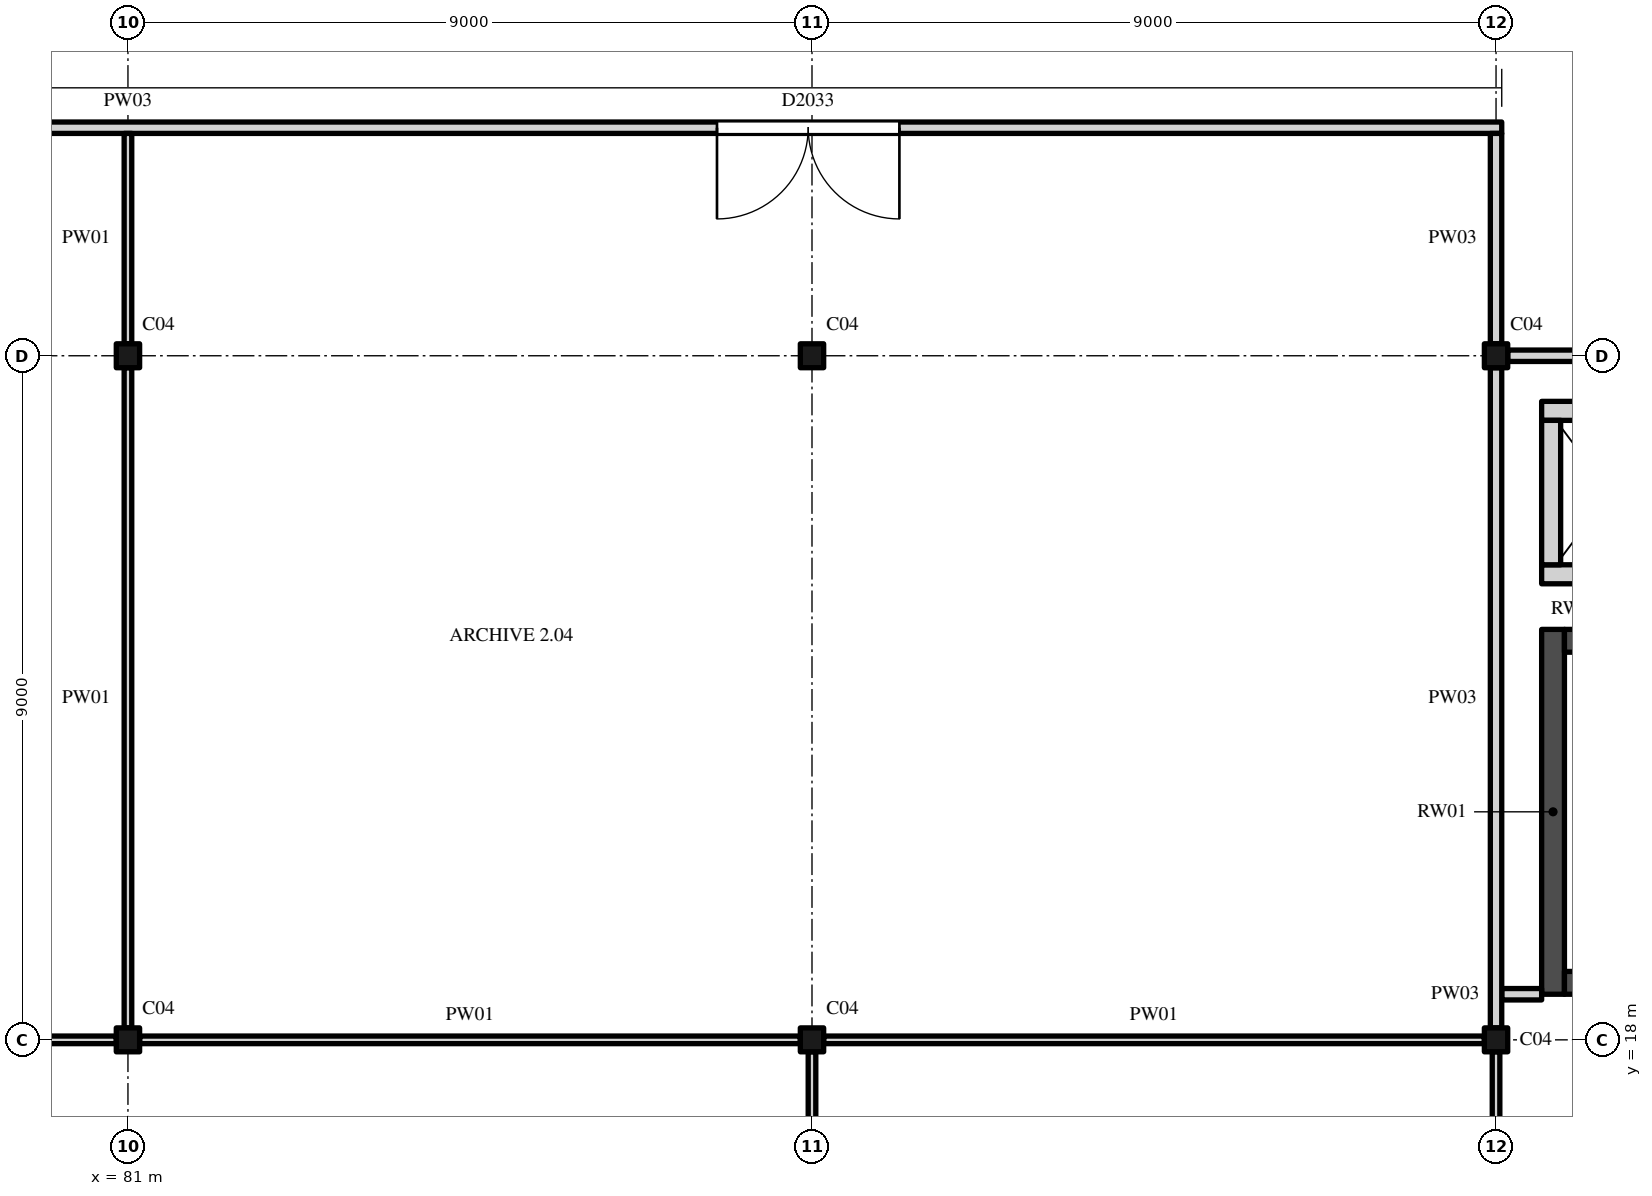
"""IFC4 building model, lengths in metres.
Left out: names, types, materials, properties, quantities, classifications, styles, units other than length and angle.
Written with IfcOpenShell. Run it as: python <this file> out.ifc"""

import sys

from ifc_helpers import new_model, si_unit, direction, frame, frame_2d, origin, origin_2d, place, context, subcontext, project, spatial, rectangle, i_section, extrude, element, fill, save


model = new_model("IFC4")
c1 = context("Model", 3, precision=1e-05, world=origin(), true_north=direction((0.0, 1.0)))
c2 = subcontext(c1, "Body", "Model", "MODEL_VIEW")
j1 = project(units=[si_unit("LENGTHUNIT", "METRE"), si_unit("PLANEANGLEUNIT", "RADIAN")], contexts=[c1])
p1 = place(None, origin())
s1 = spatial("IfcSite", under=j1, at=p1, CompositionType="ELEMENT")
p2 = place(p1, origin())
s2 = spatial("IfcBuilding", under=s1, at=p2, CompositionType="ELEMENT")
p3 = place(p2, frame((0.0, 0.0, 11.0)))
s3 = spatial("IfcBuildingStorey", under=s2, at=p3, CompositionType="ELEMENT", Elevation=11.0)
for number, where, z_axis, x_axis in (
    (1, (81.0, 18.0, 0.0), (0.0, 0.0, 1.0), (1.0, 0.0, 0.0)),
    (2, (90.0, 18.0, 0.0), (0.0, 0.0, 1.0), (1.0, 0.0, 0.0)),
    (3, (99.0, 18.0, 0.0), (0.0, 0.0, 1.0), (1.0, 0.0, 0.0)),
    (4, (81.0, 27.0, 0.0), (0.0, 0.0, 1.0), (1.0, 0.0, 0.0)),
    (5, (90.0, 27.0, 0.0), (0.0, 0.0, 1.0), (1.0, 0.0, 0.0)),
    (6, (99.0, 27.0, 0.0), (0.0, 0.0, 1.0), (1.0, 0.0, 0.0)),
):
    element("IfcColumn", number, at=place(p3, frame(where, z_axis=z_axis, x_axis=x_axis)), inside=s3, PredefinedType="COLUMN", context=c2, shape_type="SweptSolid", body=[
        extrude(i_section(OverallWidth=0.307, OverallDepth=0.315, WebThickness=0.012, FlangeThickness=0.019, FilletRadius=0.017, at=origin_2d()), origin(), (0.0, 0.0, 1.0), 5.0),
    ])
p4 = place(p3, frame((99.75, 18.6, 0.0), z_axis=(0.0, 0.0, 1.0), x_axis=(0.0, 1.0, 0.0)))
e7 = element("IfcWall", 7, at=p4, inside=s3, PredefinedType="SHEAR", context=c2, shape_type="SweptSolid", body=[
    extrude(rectangle(XDim=4.8, YDim=0.3, at=frame_2d((2.4, 0.0))), origin(), (0.0, 0.0, 1.0), 4.825),
])
p5 = place(p3, frame((99.9, 18.75, 0.0), z_axis=(0.0, 0.0, 1.0), x_axis=(1.0, 0.0, 0.0)))
e8 = element("IfcWall", 8, at=p5, inside=s3, PredefinedType="SHEAR", context=c2, shape_type="SweptSolid", body=[
    extrude(rectangle(XDim=3.45, YDim=0.3, at=frame_2d((1.725, 0.0))), origin(), (0.0, 0.0, 1.0), 4.825),
])
p6 = place(p5, frame((0.6, 0.0, 0.0)))
e9 = element("IfcOpeningElement", 9, at=p6, cuts=e8, PredefinedType="OPENING", context=c2, shape_type="SweptSolid", body=[
    extrude(rectangle(XDim=2.1, YDim=2.4, at=frame_2d((1.05, 1.2))), frame((0.0, 0.16, 0.0), z_axis=(0.0, -1.0, 0.0), x_axis=(1.0, 0.0, 0.0)), (0.0, 0.0, 1.0), 0.32),
])
p7 = place(p3, frame((99.9, 23.25, 0.0), z_axis=(0.0, 0.0, 1.0), x_axis=(1.0, 0.0, 0.0)))
e10 = element("IfcWall", 10, at=p7, inside=s3, PredefinedType="SHEAR", context=c2, shape_type="SweptSolid", body=[
    extrude(rectangle(XDim=3.45, YDim=0.3, at=frame_2d((1.725, 0.0))), origin(), (0.0, 0.0, 1.0), 4.825),
])
for number, where, z_axis, x_axis in (
    (11, (99.6, 24.125, 0.0), (0.0, 0.0, 1.0), (1.0, 0.0, 0.0)),
    (12, (99.6, 26.275, 0.0), (0.0, 0.0, 1.0), (1.0, 0.0, 0.0)),
):
    element("IfcWall", number, at=place(p3, frame(where, z_axis=z_axis, x_axis=x_axis)), inside=s3, PredefinedType="STANDARD", context=c2, shape_type="SweptSolid", body=[
        extrude(rectangle(XDim=1.8, YDim=0.25, at=frame_2d((0.9, 0.0))), origin(), (0.0, 0.0, 1.0), 4.825),
    ])
p8 = place(p3, frame((99.725, 24.25, 0.0), z_axis=(0.0, 0.0, 1.0), x_axis=(0.0, 1.0, 0.0)))
e13 = element("IfcWall", 13, at=p8, inside=s3, PredefinedType="STANDARD", context=c2, shape_type="SweptSolid", body=[
    extrude(rectangle(XDim=1.9, YDim=0.25, at=frame_2d((0.95, 0.0))), origin(), (0.0, 0.0, 1.0), 4.825),
])
for number, where, z_axis, x_axis in (
    (14, (82.5, 20.325, 5.0), (0.0, 0.0, 1.0), (1.0, 0.0, 0.0)),
    (15, (82.5, 24.675, 5.0), (0.0, 0.0, 1.0), (1.0, 0.0, 0.0)),
):
    element("IfcWall", number, at=place(p3, frame(where, z_axis=z_axis, x_axis=x_axis)), inside=s3, PredefinedType="PARAPET", context=c2, shape_type="SweptSolid", body=[
        extrude(rectangle(XDim=6.0, YDim=0.15, at=frame_2d((3.0, 0.0))), origin(), (0.0, 0.0, 1.0), 0.5),
    ])
for number, where, z_axis, x_axis in (
    (16, (82.575, 20.4, 5.0), (0.0, 0.0, 1.0), (0.0, 1.0, 0.0)),
    (17, (88.425, 20.4, 5.0), (0.0, 0.0, 1.0), (0.0, 1.0, 0.0)),
):
    element("IfcWall", number, at=place(p3, frame(where, z_axis=z_axis, x_axis=x_axis)), inside=s3, PredefinedType="PARAPET", context=c2, shape_type="SweptSolid", body=[
        extrude(rectangle(XDim=4.2, YDim=0.15, at=frame_2d((2.1, 0.0))), origin(), (0.0, 0.0, 1.0), 0.5),
    ])
for number, where, z_axis, x_axis in (
    (18, (91.5, 20.325, 5.0), (0.0, 0.0, 1.0), (1.0, 0.0, 0.0)),
    (19, (91.5, 24.675, 5.0), (0.0, 0.0, 1.0), (1.0, 0.0, 0.0)),
):
    element("IfcWall", number, at=place(p3, frame(where, z_axis=z_axis, x_axis=x_axis)), inside=s3, PredefinedType="PARAPET", context=c2, shape_type="SweptSolid", body=[
        extrude(rectangle(XDim=6.0, YDim=0.15, at=frame_2d((3.0, 0.0))), origin(), (0.0, 0.0, 1.0), 0.5),
    ])
for number, where, z_axis, x_axis in (
    (20, (91.575, 20.4, 5.0), (0.0, 0.0, 1.0), (0.0, 1.0, 0.0)),
    (21, (97.425, 20.4, 5.0), (0.0, 0.0, 1.0), (0.0, 1.0, 0.0)),
):
    element("IfcWall", number, at=place(p3, frame(where, z_axis=z_axis, x_axis=x_axis)), inside=s3, PredefinedType="PARAPET", context=c2, shape_type="SweptSolid", body=[
        extrude(rectangle(XDim=4.2, YDim=0.15, at=frame_2d((2.1, 0.0))), origin(), (0.0, 0.0, 1.0), 0.5),
    ])
p9 = place(p3, frame((82.5, 29.325, 5.0), z_axis=(0.0, 0.0, 1.0), x_axis=(1.0, 0.0, 0.0)))
e22 = element("IfcWall", 22, at=p9, inside=s3, PredefinedType="PARAPET", context=c2, shape_type="SweptSolid", body=[
    extrude(rectangle(XDim=6.0, YDim=0.15, at=frame_2d((3.0, 0.0))), origin(), (0.0, 0.0, 1.0), 0.5),
])
for number, where, z_axis, x_axis in (
    (23, (82.575, 29.4, 5.0), (0.0, 0.0, 1.0), (0.0, 1.0, 0.0)),
    (24, (88.425, 29.4, 5.0), (0.0, 0.0, 1.0), (0.0, 1.0, 0.0)),
):
    element("IfcWall", number, at=place(p3, frame(where, z_axis=z_axis, x_axis=x_axis)), inside=s3, PredefinedType="PARAPET", context=c2, shape_type="SweptSolid", body=[
        extrude(rectangle(XDim=4.2, YDim=0.15, at=frame_2d((2.1, 0.0))), origin(), (0.0, 0.0, 1.0), 0.5),
    ])
p10 = place(p3, frame((91.5, 29.325, 5.0), z_axis=(0.0, 0.0, 1.0), x_axis=(1.0, 0.0, 0.0)))
e25 = element("IfcWall", 25, at=p10, inside=s3, PredefinedType="PARAPET", context=c2, shape_type="SweptSolid", body=[
    extrude(rectangle(XDim=6.0, YDim=0.15, at=frame_2d((3.0, 0.0))), origin(), (0.0, 0.0, 1.0), 0.5),
])
for number, where, z_axis, x_axis in (
    (26, (91.575, 29.4, 5.0), (0.0, 0.0, 1.0), (0.0, 1.0, 0.0)),
    (27, (97.425, 29.4, 5.0), (0.0, 0.0, 1.0), (0.0, 1.0, 0.0)),
):
    element("IfcWall", number, at=place(p3, frame(where, z_axis=z_axis, x_axis=x_axis)), inside=s3, PredefinedType="PARAPET", context=c2, shape_type="SweptSolid", body=[
        extrude(rectangle(XDim=4.2, YDim=0.15, at=frame_2d((2.1, 0.0))), origin(), (0.0, 0.0, 1.0), 0.5),
    ])
for number, where, z_axis, x_axis in (
    (28, (72.154, 18.0, 0.0), (0.0, 0.0, 1.0), (1.0, 0.0, 0.0)),
    (29, (81.154, 18.0, 0.0), (0.0, 0.0, 1.0), (1.0, 0.0, 0.0)),
    (30, (90.154, 18.0, 0.0), (0.0, 0.0, 1.0), (1.0, 0.0, 0.0)),
):
    element("IfcWall", number, at=place(p3, frame(where, z_axis=z_axis, x_axis=x_axis)), inside=s3, PredefinedType="PARTITIONING", context=c2, shape_type="SweptSolid", body=[
        extrude(rectangle(XDim=8.693, YDim=0.1, at=frame_2d((4.346, 0.0))), origin(), (0.0, 0.0, 1.0), 4.419),
    ])
p11 = place(p3, frame((99.075, 18.6, 0.0), z_axis=(0.0, 0.0, 1.0), x_axis=(1.0, 0.0, 0.0)))
e31 = element("IfcWall", 31, at=p11, inside=s3, PredefinedType="PARTITIONING", context=c2, shape_type="SweptSolid", body=[
    extrude(rectangle(XDim=0.525, YDim=0.15, at=frame_2d((0.263, 0.0))), origin(), (0.0, 0.0, 1.0), 4.825),
])
p12 = place(p3, frame((99.154, 27.0, 0.0), z_axis=(0.0, 0.0, 1.0), x_axis=(1.0, 0.0, 0.0)))
e32 = element("IfcWall", 32, at=p12, inside=s3, PredefinedType="PARTITIONING", context=c2, shape_type="SweptSolid", body=[
    extrude(rectangle(XDim=8.693, YDim=0.15, at=frame_2d((4.346, 0.0))), origin(), (0.0, 0.0, 1.0), 4.419),
])
p13 = place(p12, frame((3.75, 0.0, 0.0)))
e33 = element("IfcOpeningElement", 33, at=p13, cuts=e32, PredefinedType="OPENING", context=c2, shape_type="SweptSolid", body=[
    extrude(rectangle(XDim=1.2, YDim=2.4, at=frame_2d((0.6, 1.2))), frame((0.0, 0.085, 0.0), z_axis=(0.0, -1.0, 0.0), x_axis=(1.0, 0.0, 0.0)), (0.0, 0.0, 1.0), 0.17),
])
p14 = place(p3, frame((62.4, 30.0, 0.0), z_axis=(0.0, 0.0, 1.0), x_axis=(1.0, 0.0, 0.0)))
e34 = element("IfcWall", 34, at=p14, inside=s3, PredefinedType="PARTITIONING", context=c2, shape_type="SweptSolid", body=[
    extrude(rectangle(XDim=36.675, YDim=0.15, at=frame_2d((18.337, 0.0))), origin(), (0.0, 0.0, 1.0), 4.422),
])
p15 = place(p14, frame((8.45, 0.0, 0.0)))
e35 = element("IfcOpeningElement", 35, at=p15, cuts=e34, PredefinedType="OPENING", context=c2, shape_type="SweptSolid", body=[
    extrude(rectangle(XDim=2.4, YDim=3.0, at=frame_2d((1.2, 1.5))), frame((0.0, 0.085, 0.0), z_axis=(0.0, -1.0, 0.0), x_axis=(1.0, 0.0, 0.0)), (0.0, 0.0, 1.0), 0.17),
])
p16 = place(p14, frame((26.35, 0.0, 0.0)))
e36 = element("IfcOpeningElement", 36, at=p16, cuts=e34, PredefinedType="OPENING", context=c2, shape_type="SweptSolid", body=[
    extrude(rectangle(XDim=2.4, YDim=3.0, at=frame_2d((1.2, 1.5))), frame((0.0, 0.085, 0.0), z_axis=(0.0, -1.0, 0.0), x_axis=(1.0, 0.0, 0.0)), (0.0, 0.0, 1.0), 0.17),
])
p17 = place(p3, frame((81.0, 18.157, 0.0), z_axis=(0.0, 0.0, 1.0), x_axis=(0.0, 1.0, 0.0)))
e37 = element("IfcWall", 37, at=p17, inside=s3, PredefinedType="PARTITIONING", context=c2, shape_type="SweptSolid", body=[
    extrude(rectangle(XDim=8.686, YDim=0.1, at=frame_2d((4.343, 0.0))), origin(), (0.0, 0.0, 1.0), 4.297),
])
p18 = place(p3, frame((81.0, 27.157, 0.0), z_axis=(0.0, 0.0, 1.0), x_axis=(0.0, 1.0, 0.0)))
e38 = element("IfcWall", 38, at=p18, inside=s3, PredefinedType="PARTITIONING", context=c2, shape_type="SweptSolid", body=[
    extrude(rectangle(XDim=2.768, YDim=0.1, at=frame_2d((1.384, 0.0))), origin(), (0.0, 0.0, 1.0), 4.297),
])
for number, where, z_axis, x_axis in (
    (39, (90.0, 12.05, 0.0), (0.0, 0.0, 1.0), (0.0, 1.0, 0.0)),
    (40, (99.0, 12.05, 0.0), (0.0, 0.0, 1.0), (0.0, 1.0, 0.0)),
):
    element("IfcWall", number, at=place(p3, frame(where, z_axis=z_axis, x_axis=x_axis)), inside=s3, PredefinedType="PARTITIONING", context=c2, shape_type="SweptSolid", body=[
        extrude(rectangle(XDim=5.793, YDim=0.1, at=frame_2d((2.896, 0.0))), origin(), (0.0, 0.0, 1.0), 4.297),
    ])
p19 = place(p3, frame((99.0, 18.157, 0.0), z_axis=(0.0, 0.0, 1.0), x_axis=(0.0, 1.0, 0.0)))
e41 = element("IfcWall", 41, at=p19, inside=s3, PredefinedType="PARTITIONING", context=c2, shape_type="SweptSolid", body=[
    extrude(rectangle(XDim=8.686, YDim=0.15, at=frame_2d((4.343, 0.0))), origin(), (0.0, 0.0, 1.0), 4.297),
])
p20 = place(p3, frame((99.0, 27.157, 0.0), z_axis=(0.0, 0.0, 1.0), x_axis=(0.0, 1.0, 0.0)))
e42 = element("IfcWall", 42, at=p20, inside=s3, PredefinedType="PARTITIONING", context=c2, shape_type="SweptSolid", body=[
    extrude(rectangle(XDim=2.768, YDim=0.15, at=frame_2d((1.384, 0.0))), origin(), (0.0, 0.0, 1.0), 4.297),
])
p21 = place(p16, origin())
e43 = element("IfcDoor", 43, at=p21, inside=s3, OperationType="DOUBLE_DOOR_SINGLE_SWING", PredefinedType="DOOR", context=c2, shape_type="SweptSolid", body=[
    extrude(rectangle(XDim=2.4, YDim=3.0, at=frame_2d((1.2, 1.5))), frame((0.0, 0.025, 0.0), z_axis=(0.0, -1.0, 0.0), x_axis=(1.0, 0.0, 0.0)), (0.0, 0.0, 1.0), 0.05),
])
fill(e36, e43)
save(model, sys.argv[1])
